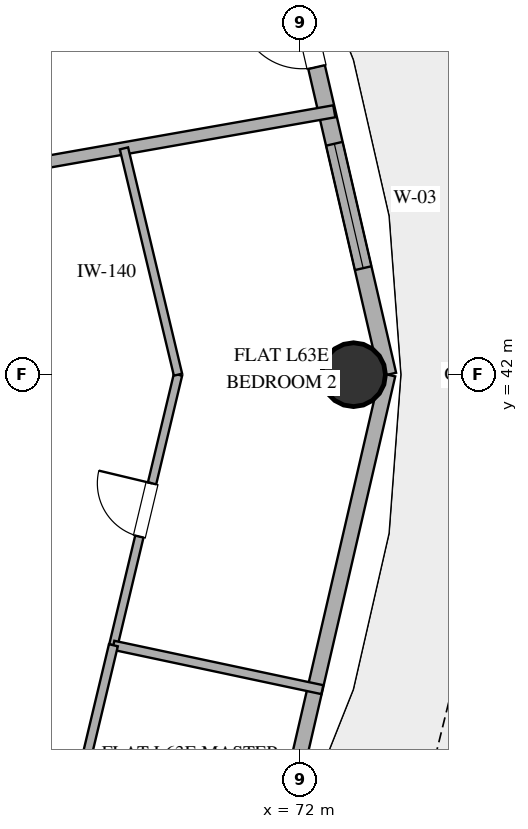
"""IFC4 building model, lengths in metres.
Left out: names, types, materials, properties, quantities, classifications, styles, units other than length and angle.
Written with IfcOpenShell. Run it as: python <this file> out.ifc"""

import sys

from ifc_helpers import new_model, si_unit, direction, frame, frame_2d, origin, origin_2d, place, context, subcontext, project, spatial, rectangle, hollow_circle, extrude, element, fill, save


model = new_model("IFC4")
c1 = context("Model", 3, precision=1e-05, world=origin(), true_north=direction((0.0, 1.0)))
c2 = subcontext(c1, "Body", "Model", "MODEL_VIEW")
j1 = project(units=[si_unit("LENGTHUNIT", "METRE"), si_unit("PLANEANGLEUNIT", "RADIAN")], contexts=[c1])
p1 = place(None, origin())
s1 = spatial("IfcSite", under=j1, at=p1, CompositionType="ELEMENT")
p2 = place(p1, origin())
s2 = spatial("IfcBuilding", under=s1, at=p2, CompositionType="ELEMENT")
p3 = place(p2, frame((0.0, 0.0, 246.0)))
s3 = spatial("IfcBuildingStorey", under=s2, at=p3, CompositionType="ELEMENT", Elevation=246.0)
p4 = place(p3, frame((72.883, 42.0, 0.0), z_axis=(0.0, 0.0, 1.0), x_axis=(1.0, 0.0, 0.0)))
e1 = element("IfcColumn", 1, at=p4, inside=s3, PredefinedType="COLUMN", context=c2, shape_type="SweptSolid", body=[
    extrude(hollow_circle(Radius=0.525, WallThickness=0.028, at=origin_2d()), origin(), (0.0, 0.0, 1.0), 3.36),
])
p5 = place(p3, frame((73.447, 42.0, 0.0), z_axis=(0.0, 0.0, 1.0), x_axis=(-0.225635078214, 0.974211892495, 0.0)))
e2 = element("IfcWall", 2, at=p5, inside=s3, PredefinedType="SOLIDWALL", context=c2, shape_type="SweptSolid", body=[
    extrude(rectangle(XDim=7.77, YDim=0.28, at=frame_2d((3.885, 0.0))), origin(), (0.0, 0.0, 1.0), 3.36),
])
p6 = place(p5, frame((1.798, 0.0, 0.85)))
e3 = element("IfcOpeningElement", 3, at=p6, cuts=e2, PredefinedType="OPENING", context=c2, shape_type="SweptSolid", body=[
    extrude(rectangle(XDim=2.1, YDim=2.2, at=frame_2d((1.05, 1.1))), frame((0.0, 0.15, 0.0), z_axis=(0.0, -1.0, 0.0), x_axis=(1.0, 0.0, 0.0)), (0.0, 0.0, 1.0), 0.3),
])
p7 = place(p5, frame((5.192, 0.0, 0.0)))
e4 = element("IfcOpeningElement", 4, at=p7, cuts=e2, PredefinedType="OPENING", context=c2, shape_type="SweptSolid", body=[
    extrude(rectangle(XDim=1.05, YDim=2.2, at=frame_2d((0.525, 1.1))), frame((0.0, 0.15, 0.0), z_axis=(0.0, -1.0, 0.0), x_axis=(1.0, 0.0, 0.0)), (0.0, 0.0, 1.0), 0.3),
])
p8 = place(p3, frame((71.694, 34.43, 0.0), z_axis=(0.0, 0.0, 1.0), x_axis=(0.225635078214, 0.974211892495, 0.0)))
e5 = element("IfcWall", 5, at=p8, inside=s3, PredefinedType="SOLIDWALL", context=c2, shape_type="SweptSolid", body=[
    extrude(rectangle(XDim=7.77, YDim=0.25, at=frame_2d((3.885, 0.0))), origin(), (0.0, 0.0, 1.0), 3.36),
])
p9 = place(p3, frame((63.25, 44.689, 0.0), z_axis=(0.0, 0.0, 1.0), x_axis=(0.984806931753, 0.173652835192, 0.0)))
e6 = element("IfcWall", 6, at=p9, inside=s3, PredefinedType="PARTITIONING", context=c2, shape_type="SweptSolid", body=[
    extrude(rectangle(XDim=9.46, YDim=0.2, at=frame_2d((4.73, 0.0))), origin(), (0.0, 0.0, 1.0), 2.72),
])
p10 = place(p3, frame((68.934, 37.55, 0.0), z_axis=(0.0, 0.0, 1.0), x_axis=(0.232301055554, 0.972643932582, 0.0)))
e7 = element("IfcWall", 7, at=p10, inside=s3, PredefinedType="PARTITIONING", context=c2, shape_type="SweptSolid", body=[
    extrude(rectangle(XDim=4.575, YDim=0.14, at=frame_2d((2.288, 0.0))), origin(), (0.0, 0.0, 1.0), 2.72),
])
p11 = place(p10, frame((1.837, 0.0, 0.0)))
e8 = element("IfcOpeningElement", 8, at=p11, cuts=e7, PredefinedType="OPENING", context=c2, shape_type="SweptSolid", body=[
    extrude(rectangle(XDim=0.9, YDim=2.1, at=frame_2d((0.45, 1.05))), frame((0.0, 0.08, 0.0), z_axis=(0.0, -1.0, 0.0), x_axis=(1.0, 0.0, 0.0)), (0.0, 0.0, 1.0), 0.16),
])
p12 = place(p3, frame((69.996, 42.0, 0.0), z_axis=(0.0, 0.0, 1.0), x_axis=(-0.232313421965, 0.972640978972, 0.0)))
e9 = element("IfcWall", 9, at=p12, inside=s3, PredefinedType="PARTITIONING", context=c2, shape_type="SweptSolid", body=[
    extrude(rectangle(XDim=3.826, YDim=0.14, at=frame_2d((1.913, 0.0))), origin(), (0.0, 0.0, 1.0), 2.72),
])
p13 = place(p3, frame((72.37, 36.82, 0.0), z_axis=(0.0, 0.0, 1.0), x_axis=(-0.978163972004, 0.20783465513, 0.0)))
e10 = element("IfcWall", 10, at=p13, inside=s3, PredefinedType="PARTITIONING", context=c2, shape_type="SweptSolid", body=[
    extrude(rectangle(XDim=3.513, YDim=0.15, at=frame_2d((1.757, 0.0))), origin(), (0.0, 0.0, 1.0), 2.72),
])
p14 = place(p3, frame((68.481, 35.655, 0.0), z_axis=(0.0, 0.0, 1.0), x_axis=(0.232292373483, 0.97264600612, 0.0)))
e11 = element("IfcWall", 11, at=p14, inside=s3, PredefinedType="PARTITIONING", context=c2, shape_type="SweptSolid", body=[
    extrude(rectangle(XDim=1.948, YDim=0.15, at=frame_2d((0.974, 0.0))), origin(), (0.0, 0.0, 1.0), 2.72),
])
p15 = place(p6, origin())
e12 = element("IfcWindow", 12, at=p15, inside=s3, PartitioningType="SINGLE_PANEL", PredefinedType="WINDOW", context=c2, shape_type="SweptSolid", body=[
    extrude(rectangle(XDim=2.1, YDim=2.2, at=frame_2d((1.05, 1.1))), frame((0.0, 0.03, 0.0), z_axis=(0.0, -1.0, 0.0), x_axis=(1.0, 0.0, 0.0)), (0.0, 0.0, 1.0), 0.06),
])
fill(e3, e12)
p16 = place(p7, origin())
e13 = element("IfcDoor", 13, at=p16, inside=s3, OperationType="SINGLE_SWING_RIGHT", PredefinedType="DOOR", context=c2, shape_type="SweptSolid", body=[
    extrude(rectangle(XDim=1.05, YDim=2.2, at=frame_2d((0.525, 1.1))), frame((0.0, 0.025, 0.0), z_axis=(0.0, -1.0, 0.0), x_axis=(1.0, 0.0, 0.0)), (0.0, 0.0, 1.0), 0.05),
])
fill(e4, e13)
p17 = place(p11, origin())
e14 = element("IfcDoor", 14, at=p17, inside=s3, OperationType="SINGLE_SWING_RIGHT", PredefinedType="DOOR", context=c2, shape_type="SweptSolid", body=[
    extrude(rectangle(XDim=0.9, YDim=2.1, at=frame_2d((0.45, 1.05))), frame((0.0, 0.025, 0.0), z_axis=(0.0, -1.0, 0.0), x_axis=(1.0, 0.0, 0.0)), (0.0, 0.0, 1.0), 0.05),
])
fill(e8, e14)
save(model, sys.argv[1])
